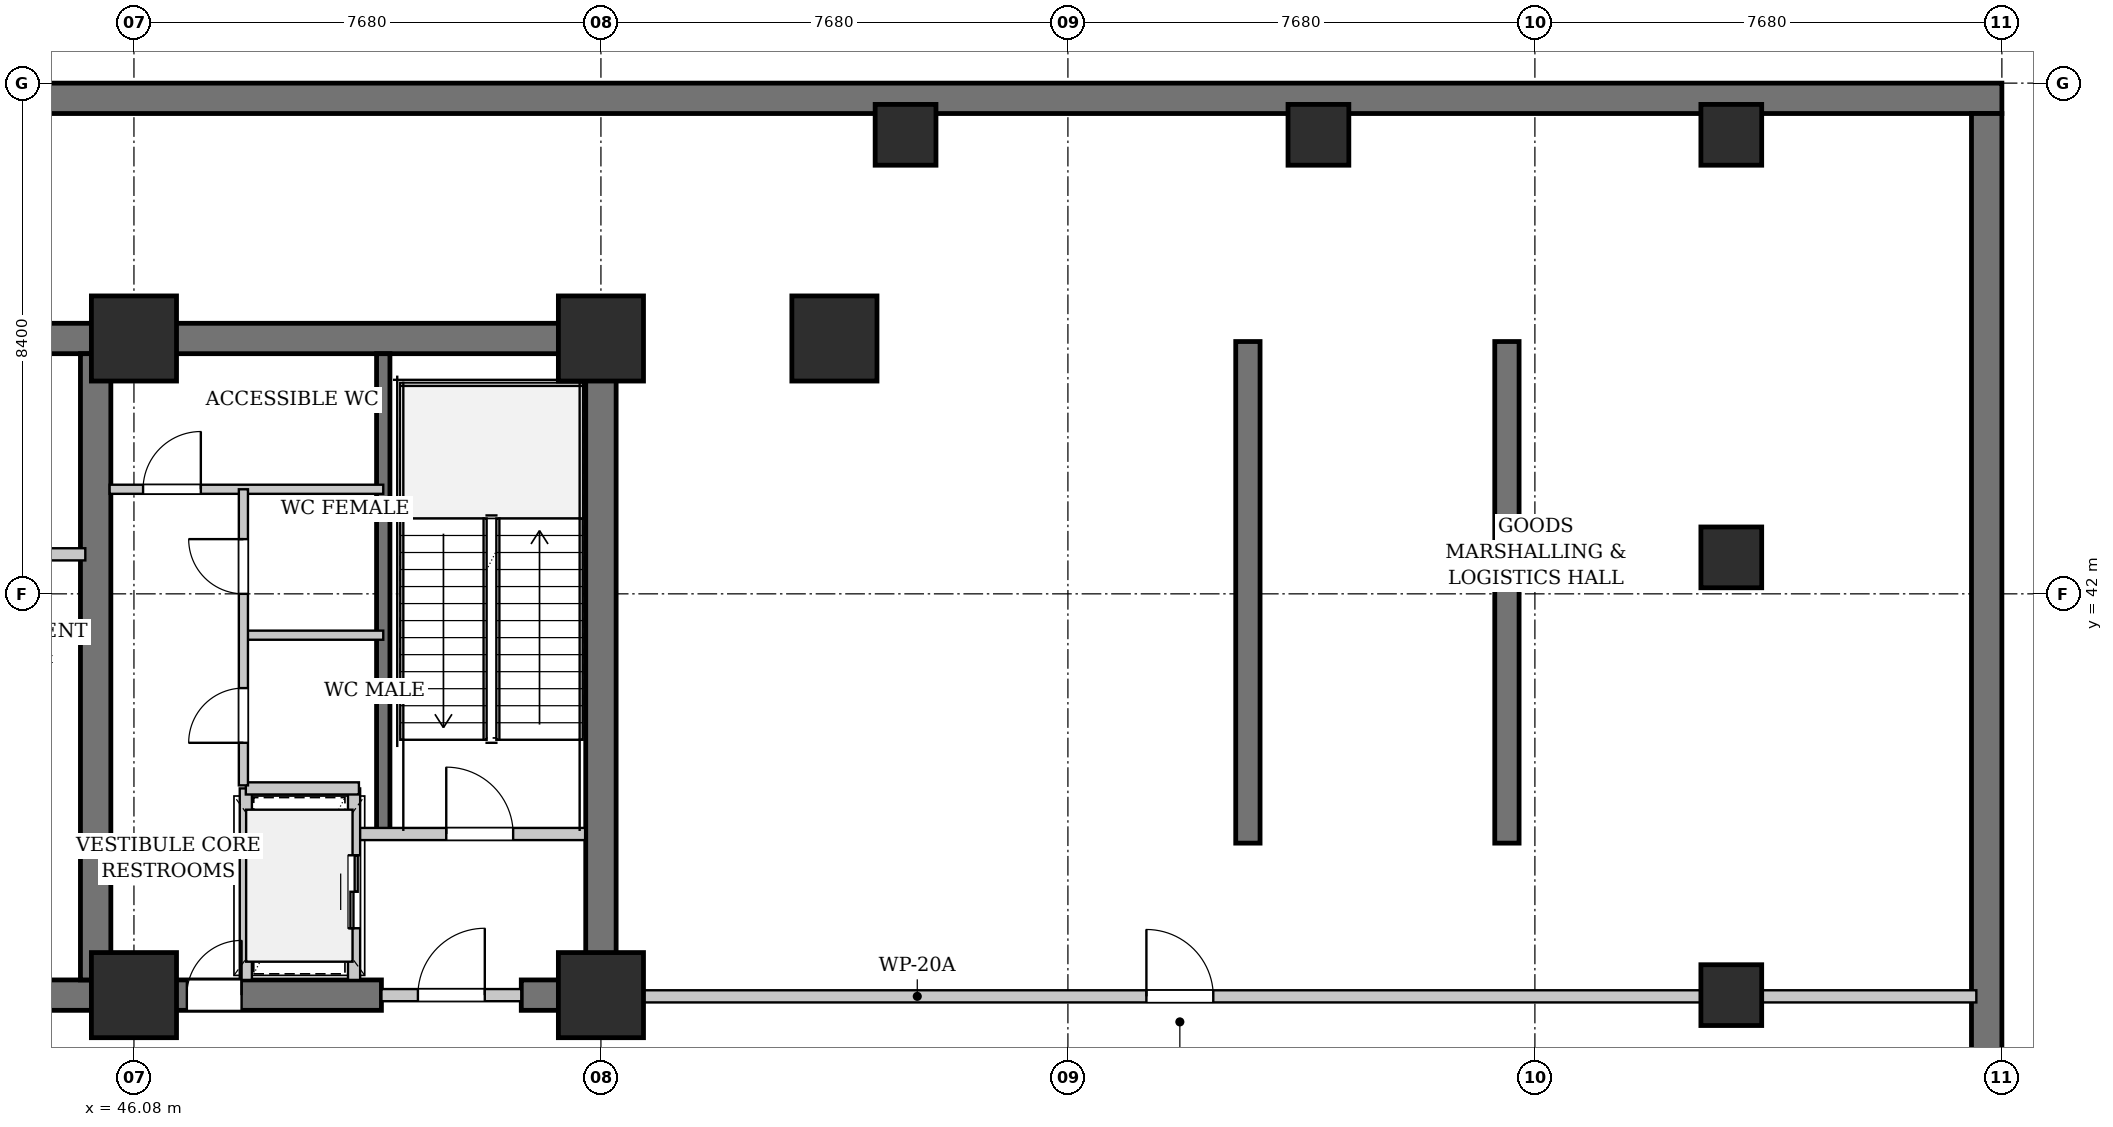
"""IFC4 building model, lengths in metres.
Left out: names, types, materials, properties, quantities, classifications, styles, units other than length and angle.
Written with IfcOpenShell. Run it as: python <this file> out.ifc"""

import sys

from ifc_helpers import new_model, si_unit, direction, frame, frame_2d, origin, origin_2d, place, context, subcontext, project, spatial, rectangle, extrude, element, fill, save


model = new_model("IFC4")
c1 = context("Model", 3, precision=1e-05, world=origin(), true_north=direction((0.0, 1.0)))
c2 = subcontext(c1, "Body", "Model", "MODEL_VIEW")
j1 = project(units=[si_unit("LENGTHUNIT", "METRE"), si_unit("PLANEANGLEUNIT", "RADIAN")], contexts=[c1])
p1 = place(None, origin())
s1 = spatial("IfcSite", under=j1, at=p1, CompositionType="ELEMENT")
p2 = place(p1, origin())
s2 = spatial("IfcBuilding", under=s1, at=p2, CompositionType="ELEMENT")
p3 = place(p2, frame((0.0, 0.0, -5.0)))
s3 = spatial("IfcBuildingStorey", under=s2, at=p3, CompositionType="ELEMENT", Elevation=-5.0)
p4 = place(p3, frame((0.0, 50.15, 0.0), z_axis=(0.0, 0.0, 1.0), x_axis=(1.0, 0.0, 0.0)))
e1 = element("IfcWall", 1, at=p4, inside=s3, PredefinedType="USERDEFINED", context=c2, shape_type="SweptSolid", body=[
    extrude(rectangle(XDim=76.8, YDim=0.5, at=frame_2d((38.4, 0.0))), origin(), (0.0, 0.0, 1.0), 4.65),
])
p5 = place(p3, frame((76.55, 0.5, 0.0), z_axis=(0.0, 0.0, 1.0), x_axis=(0.0, 1.0, 0.0)))
e2 = element("IfcWall", 2, at=p5, inside=s3, PredefinedType="USERDEFINED", context=c2, shape_type="SweptSolid", body=[
    extrude(rectangle(XDim=49.4, YDim=0.5, at=frame_2d((24.7, 0.0))), origin(), (0.0, 0.0, 1.0), 4.65),
])
p6 = place(p3, frame((22.79, 46.2, 0.0), z_axis=(0.0, 0.0, 1.0), x_axis=(1.0, 0.0, 0.0)))
e3 = element("IfcWall", 3, at=p6, inside=s3, PredefinedType="SHEAR", context=c2, shape_type="SweptSolid", body=[
    extrude(rectangle(XDim=31.22, YDim=0.5, at=frame_2d((15.61, 0.0))), origin(), (0.0, 0.0, 1.0), 4.65),
])
p7 = place(p3, frame((42.1, 35.4, 0.0), z_axis=(0.0, 0.0, 1.0), x_axis=(1.0, 0.0, 0.0)))
e4 = element("IfcWall", 4, at=p7, inside=s3, PredefinedType="SHEAR", context=c2, shape_type="SweptSolid", body=[
    extrude(rectangle(XDim=8.05, YDim=0.5, at=frame_2d((4.025, 0.0))), origin(), (0.0, 0.0, 1.0), 4.65),
])
p8 = place(p7, frame((4.85, 0.0, 0.0)))
e5 = element("IfcOpeningElement", 5, at=p8, cuts=e4, PredefinedType="OPENING", context=c2, shape_type="SweptSolid", body=[
    extrude(rectangle(XDim=0.9, YDim=2.15, at=frame_2d((0.45, 1.075))), frame((0.0, 0.26, 0.0), z_axis=(0.0, -1.0, 0.0), x_axis=(1.0, 0.0, 0.0)), (0.0, 0.0, 1.0), 0.52),
])
p9 = place(p3, frame((52.45, 35.4, 0.0), z_axis=(0.0, 0.0, 1.0), x_axis=(1.0, 0.0, 0.0)))
e6 = element("IfcWall", 6, at=p9, inside=s3, PredefinedType="SHEAR", context=c2, shape_type="SweptSolid", body=[
    extrude(rectangle(XDim=1.56, YDim=0.5, at=frame_2d((0.78, 0.0))), origin(), (0.0, 0.0, 1.0), 4.65),
])
for number, where, z_axis, x_axis in (
    (7, (45.45, 35.65, 0.0), (0.0, 0.0, 1.0), (0.0, 1.0, 0.0)),
    (8, (53.76, 35.65, 0.0), (0.0, 0.0, 1.0), (0.0, 1.0, 0.0)),
):
    element("IfcWall", number, at=place(p3, frame(where, z_axis=z_axis, x_axis=x_axis)), inside=s3, PredefinedType="SHEAR", context=c2, shape_type="SweptSolid", body=[
        extrude(rectangle(XDim=10.3, YDim=0.5, at=frame_2d((5.15, 0.0))), origin(), (0.0, 0.0, 1.0), 4.65),
    ])
p10 = place(p3, frame((50.18, 38.05, 0.0), z_axis=(0.0, 0.0, 1.0), x_axis=(0.0, 1.0, 0.0)))
e9 = element("IfcWall", 9, at=p10, inside=s3, PredefinedType="SHEAR", context=c2, shape_type="SweptSolid", body=[
    extrude(rectangle(XDim=7.9, YDim=0.22, at=frame_2d((3.95, 0.0))), origin(), (0.0, 0.0, 1.0), 4.65),
])
for number, where, z_axis, x_axis in (
    (10, (64.4, 37.9, 0.0), (0.0, 0.0, 1.0), (0.0, 1.0, 0.0)),
    (11, (68.66, 37.9, 0.0), (0.0, 0.0, 1.0), (0.0, 1.0, 0.0)),
):
    element("IfcWall", number, at=place(p3, frame(where, z_axis=z_axis, x_axis=x_axis)), inside=s3, PredefinedType="SHEAR", context=c2, shape_type="SweptSolid", body=[
        extrude(rectangle(XDim=8.25, YDim=0.4, at=frame_2d((4.125, 0.0))), origin(), (0.0, 0.0, 1.0), 4.65),
    ])
for number, where, z_axis, x_axis in (
    (12, (46.08, 35.4, 0.0), (0.0, 0.0, 1.0), (1.0, 0.0, 0.0)),
    (13, (46.08, 46.2, 0.0), (0.0, 0.0, 1.0), (1.0, 0.0, 0.0)),
    (14, (53.76, 35.4, 0.0), (0.0, 0.0, 1.0), (1.0, 0.0, 0.0)),
    (15, (53.76, 46.2, 0.0), (0.0, 0.0, 1.0), (1.0, 0.0, 0.0)),
    (16, (57.6, 46.2, 0.0), (0.0, 0.0, 1.0), (1.0, 0.0, 0.0)),
):
    element("IfcColumn", number, at=place(p3, frame(where, z_axis=z_axis, x_axis=x_axis)), inside=s3, PredefinedType="COLUMN", context=c2, shape_type="SweptSolid", body=[
        extrude(rectangle(XDim=1.4, YDim=1.4, at=origin_2d()), origin(), (0.0, 0.0, 1.0), 5.0),
    ])
for number, where, z_axis, x_axis in (
    (17, (58.77, 49.55, 0.0), (0.0, 0.0, 1.0), (1.0, 0.0, 0.0)),
    (18, (65.56, 49.55, 0.0), (0.0, 0.0, 1.0), (1.0, 0.0, 0.0)),
    (19, (72.35, 49.55, 0.0), (0.0, 0.0, 1.0), (1.0, 0.0, 0.0)),
    (20, (72.35, 35.4, 0.0), (0.0, 0.0, 1.0), (1.0, 0.0, 0.0)),
    (21, (72.35, 42.6, 0.0), (0.0, 0.0, 1.0), (1.0, 0.0, 0.0)),
):
    element("IfcColumn", number, at=place(p3, frame(where, z_axis=z_axis, x_axis=x_axis)), inside=s3, PredefinedType="COLUMN", context=c2, shape_type="SweptSolid", body=[
        extrude(rectangle(XDim=1.0, YDim=1.0, at=origin_2d()), origin(), (0.0, 0.0, 1.0), 5.0),
    ])
p11 = place(p3, frame((36.6, 42.65, 0.0), z_axis=(0.0, 0.0, 1.0), x_axis=(1.0, 0.0, 0.0)))
e22 = element("IfcWall", 22, at=p11, inside=s3, PredefinedType="PARTITIONING", context=c2, shape_type="SweptSolid", body=[
    extrude(rectangle(XDim=8.68, YDim=0.2, at=frame_2d((4.34, 0.0))), origin(), (0.0, 0.0, 1.0), 4.65),
])
p12 = place(p11, frame((2.4, 0.0, 0.0)))
e23 = element("IfcOpeningElement", 23, at=p12, cuts=e22, PredefinedType="OPENING", context=c2, shape_type="SweptSolid", body=[
    extrude(rectangle(XDim=0.9, YDim=2.15, at=frame_2d((0.45, 1.075))), frame((0.0, 0.11, 0.0), z_axis=(0.0, -1.0, 0.0), x_axis=(1.0, 0.0, 0.0)), (0.0, 0.0, 1.0), 0.22),
])
p13 = place(p3, frame((49.78, 38.05, 0.0), z_axis=(0.0, 0.0, 1.0), x_axis=(1.0, 0.0, 0.0)))
e24 = element("IfcWall", 24, at=p13, inside=s3, PredefinedType="PARTITIONING", context=c2, shape_type="SweptSolid", body=[
    extrude(rectangle(XDim=3.72, YDim=0.2, at=frame_2d((1.86, 0.0))), origin(), (0.0, 0.0, 1.0), 4.65),
])
p14 = place(p13, frame((1.436, 0.0, 0.0)))
e25 = element("IfcOpeningElement", 25, at=p14, cuts=e24, PredefinedType="OPENING", context=c2, shape_type="SweptSolid", body=[
    extrude(rectangle(XDim=1.1, YDim=2.15, at=frame_2d((0.55, 1.075))), frame((0.0, 0.11, 0.0), z_axis=(0.0, -1.0, 0.0), x_axis=(1.0, 0.0, 0.0)), (0.0, 0.0, 1.0), 0.22),
])
p15 = place(p3, frame((50.15, 35.4, 0.0), z_axis=(0.0, 0.0, 1.0), x_axis=(1.0, 0.0, 0.0)))
e26 = element("IfcWall", 26, at=p15, inside=s3, PredefinedType="PARTITIONING", context=c2, shape_type="SweptSolid", body=[
    extrude(rectangle(XDim=2.3, YDim=0.2, at=frame_2d((1.15, 0.0))), origin(), (0.0, 0.0, 1.0), 3.845),
])
p16 = place(p15, frame((0.6, 0.0, 0.0)))
e27 = element("IfcOpeningElement", 27, at=p16, cuts=e26, PredefinedType="OPENING", context=c2, shape_type="SweptSolid", body=[
    extrude(rectangle(XDim=1.1, YDim=2.15, at=frame_2d((0.55, 1.075))), frame((0.0, 0.11, 0.0), z_axis=(0.0, -1.0, 0.0), x_axis=(1.0, 0.0, 0.0)), (0.0, 0.0, 1.0), 0.22),
])
p17 = place(p3, frame((49.7, 35.65, 0.0), z_axis=(0.0, 0.0, 1.0), x_axis=(0.0, 1.0, 0.0)))
e28 = element("IfcWall", 28, at=p17, inside=s3, PredefinedType="PARTITIONING", context=c2, shape_type="SweptSolid", body=[
    extrude(rectangle(XDim=3.15, YDim=0.2, at=frame_2d((1.575, 0.0))), origin(), (0.0, 0.0, 1.0), 4.65),
])
p18 = place(p17, frame((0.85, 0.0, 0.0)))
e29 = element("IfcOpeningElement", 29, at=p18, cuts=e28, PredefinedType="OPENING", context=c2, shape_type="SweptSolid", body=[
    extrude(rectangle(XDim=1.2, YDim=2.2, at=frame_2d((0.6, 1.1))), frame((0.0, 0.11, 0.0), z_axis=(0.0, -1.0, 0.0), x_axis=(1.0, 0.0, 0.0)), (0.0, 0.0, 1.0), 0.22),
])
p19 = place(p3, frame((47.92, 35.65, 0.0), z_axis=(0.0, 0.0, 1.0), x_axis=(0.0, 1.0, 0.0)))
e30 = element("IfcWall", 30, at=p19, inside=s3, PredefinedType="PARTITIONING", context=c2, shape_type="SweptSolid", body=[
    extrude(rectangle(XDim=3.15, YDim=0.2, at=frame_2d((1.575, 0.0))), origin(), (0.0, 0.0, 1.0), 4.65),
])
p20 = place(p3, frame((47.92, 38.8, 0.0), z_axis=(0.0, 0.0, 1.0), x_axis=(1.0, 0.0, 0.0)))
e31 = element("IfcWall", 31, at=p20, inside=s3, PredefinedType="PARTITIONING", context=c2, shape_type="SweptSolid", body=[
    extrude(rectangle(XDim=1.86, YDim=0.2, at=frame_2d((0.93, 0.0))), origin(), (0.0, 0.0, 1.0), 4.65),
])
p21 = place(p3, frame((45.68, 43.72, 0.0), z_axis=(0.0, 0.0, 1.0), x_axis=(1.0, 0.0, 0.0)))
e32 = element("IfcWall", 32, at=p21, inside=s3, PredefinedType="PARTITIONING", context=c2, shape_type="SweptSolid", body=[
    extrude(rectangle(XDim=4.5, YDim=0.15, at=frame_2d((2.25, 0.0))), origin(), (0.0, 0.0, 1.0), 4.65),
])
p22 = place(p21, frame((0.55, 0.0, 0.0)))
e33 = element("IfcOpeningElement", 33, at=p22, cuts=e32, PredefinedType="OPENING", context=c2, shape_type="SweptSolid", body=[
    extrude(rectangle(XDim=0.95, YDim=2.15, at=frame_2d((0.475, 1.075))), frame((0.0, 0.085, 0.0), z_axis=(0.0, -1.0, 0.0), x_axis=(1.0, 0.0, 0.0)), (0.0, 0.0, 1.0), 0.17),
])
p23 = place(p3, frame((47.88, 41.32, 0.0), z_axis=(0.0, 0.0, 1.0), x_axis=(1.0, 0.0, 0.0)))
e34 = element("IfcWall", 34, at=p23, inside=s3, PredefinedType="PARTITIONING", context=c2, shape_type="SweptSolid", body=[
    extrude(rectangle(XDim=2.3, YDim=0.15, at=frame_2d((1.15, 0.0))), origin(), (0.0, 0.0, 1.0), 4.65),
])
p24 = place(p3, frame((47.88, 38.85, 0.0), z_axis=(0.0, 0.0, 1.0), x_axis=(0.0, 1.0, 0.0)))
e35 = element("IfcWall", 35, at=p24, inside=s3, PredefinedType="PARTITIONING", context=c2, shape_type="SweptSolid", body=[
    extrude(rectangle(XDim=4.87, YDim=0.15, at=frame_2d((2.435, 0.0))), origin(), (0.0, 0.0, 1.0), 4.65),
])
p25 = place(p24, frame((0.7, 0.0, 0.0)))
e36 = element("IfcOpeningElement", 36, at=p25, cuts=e35, PredefinedType="OPENING", context=c2, shape_type="SweptSolid", body=[
    extrude(rectangle(XDim=0.9, YDim=2.15, at=frame_2d((0.45, 1.075))), frame((0.0, 0.085, 0.0), z_axis=(0.0, -1.0, 0.0), x_axis=(1.0, 0.0, 0.0)), (0.0, 0.0, 1.0), 0.17),
])
p26 = place(p24, frame((3.15, 0.0, 0.0)))
e37 = element("IfcOpeningElement", 37, at=p26, cuts=e35, PredefinedType="OPENING", context=c2, shape_type="SweptSolid", body=[
    extrude(rectangle(XDim=0.9, YDim=2.15, at=frame_2d((0.45, 1.075))), frame((0.0, 0.085, 0.0), z_axis=(0.0, -1.0, 0.0), x_axis=(1.0, 0.0, 0.0)), (0.0, 0.0, 1.0), 0.17),
])
p27 = place(p3, frame((54.05, 35.38, 0.0), z_axis=(0.0, 0.0, 1.0), x_axis=(1.0, 0.0, 0.0)))
e38 = element("IfcWall", 38, at=p27, inside=s3, PredefinedType="PARTITIONING", context=c2, shape_type="SweptSolid", body=[
    extrude(rectangle(XDim=22.33, YDim=0.2, at=frame_2d((11.165, 0.0))), origin(), (0.0, 0.0, 1.0), 3.845),
])
p28 = place(p27, frame((8.681, 0.0, 0.0)))
e39 = element("IfcOpeningElement", 39, at=p28, cuts=e38, PredefinedType="OPENING", context=c2, shape_type="SweptSolid", body=[
    extrude(rectangle(XDim=1.1, YDim=2.15, at=frame_2d((0.55, 1.075))), frame((0.0, 0.11, 0.0), z_axis=(0.0, -1.0, 0.0), x_axis=(1.0, 0.0, 0.0)), (0.0, 0.0, 1.0), 0.22),
])
p29 = place(p14, origin())
e40 = element("IfcDoor", 40, at=p29, inside=s3, OperationType="SINGLE_SWING_LEFT", PredefinedType="DOOR", context=c2, shape_type="SweptSolid", body=[
    extrude(rectangle(XDim=1.1, YDim=2.15, at=frame_2d((0.55, 1.075))), frame((0.0, 0.025, 0.0), z_axis=(0.0, -1.0, 0.0), x_axis=(1.0, 0.0, 0.0)), (0.0, 0.0, 1.0), 0.05),
])
fill(e25, e40)
p30 = place(p16, origin())
e41 = element("IfcDoor", 41, at=p30, inside=s3, OperationType="SINGLE_SWING_RIGHT", PredefinedType="DOOR", context=c2, shape_type="SweptSolid", body=[
    extrude(rectangle(XDim=1.1, YDim=2.15, at=frame_2d((0.55, 1.075))), frame((0.0, 0.025, 0.0), z_axis=(0.0, -1.0, 0.0), x_axis=(1.0, 0.0, 0.0)), (0.0, 0.0, 1.0), 0.05),
])
fill(e27, e41)
p31 = place(p18, origin())
e42 = element("IfcDoor", 42, at=p31, inside=s3, OperationType="DOUBLE_DOOR_SLIDING", PredefinedType="DOOR", context=c2, shape_type="SweptSolid", body=[
    extrude(rectangle(XDim=1.2, YDim=2.2, at=frame_2d((0.6, 1.1))), frame((0.0, 0.025, 0.0), z_axis=(0.0, -1.0, 0.0), x_axis=(1.0, 0.0, 0.0)), (0.0, 0.0, 1.0), 0.05),
])
fill(e29, e42)
p32 = place(p22, origin())
e43 = element("IfcDoor", 43, at=p32, inside=s3, OperationType="SINGLE_SWING_RIGHT", PredefinedType="DOOR", context=c2, shape_type="SweptSolid", body=[
    extrude(rectangle(XDim=0.95, YDim=2.15, at=frame_2d((0.475, 1.075))), frame((0.0, 0.025, 0.0), z_axis=(0.0, -1.0, 0.0), x_axis=(1.0, 0.0, 0.0)), (0.0, 0.0, 1.0), 0.05),
])
fill(e33, e43)
p33 = place(p25, origin())
e44 = element("IfcDoor", 44, at=p33, inside=s3, OperationType="SINGLE_SWING_LEFT", PredefinedType="DOOR", context=c2, shape_type="SweptSolid", body=[
    extrude(rectangle(XDim=0.9, YDim=2.15, at=frame_2d((0.45, 1.075))), frame((0.0, 0.025, 0.0), z_axis=(0.0, -1.0, 0.0), x_axis=(1.0, 0.0, 0.0)), (0.0, 0.0, 1.0), 0.05),
])
fill(e36, e44)
p34 = place(p26, origin())
e45 = element("IfcDoor", 45, at=p34, inside=s3, OperationType="SINGLE_SWING_RIGHT", PredefinedType="DOOR", context=c2, shape_type="SweptSolid", body=[
    extrude(rectangle(XDim=0.9, YDim=2.15, at=frame_2d((0.45, 1.075))), frame((0.0, 0.025, 0.0), z_axis=(0.0, -1.0, 0.0), x_axis=(1.0, 0.0, 0.0)), (0.0, 0.0, 1.0), 0.05),
])
fill(e37, e45)
p35 = place(p28, origin())
e46 = element("IfcDoor", 46, at=p35, inside=s3, OperationType="SINGLE_SWING_LEFT", PredefinedType="DOOR", context=c2, shape_type="SweptSolid", body=[
    extrude(rectangle(XDim=1.1, YDim=2.15, at=frame_2d((0.55, 1.075))), frame((0.0, 0.025, 0.0), z_axis=(0.0, -1.0, 0.0), x_axis=(1.0, 0.0, 0.0)), (0.0, 0.0, 1.0), 0.05),
])
fill(e39, e46)
p36 = place(p8, origin())
e47 = element("IfcDoor", 47, at=p36, inside=s3, OperationType="SINGLE_SWING_RIGHT", PredefinedType="DOOR", context=c2, shape_type="SweptSolid", body=[
    extrude(rectangle(XDim=0.9, YDim=2.15, at=frame_2d((0.45, 1.075))), frame((0.0, 0.025, 0.0), z_axis=(0.0, -1.0, 0.0), x_axis=(1.0, 0.0, 0.0)), (0.0, 0.0, 1.0), 0.05),
])
fill(e5, e47)
save(model, sys.argv[1])
